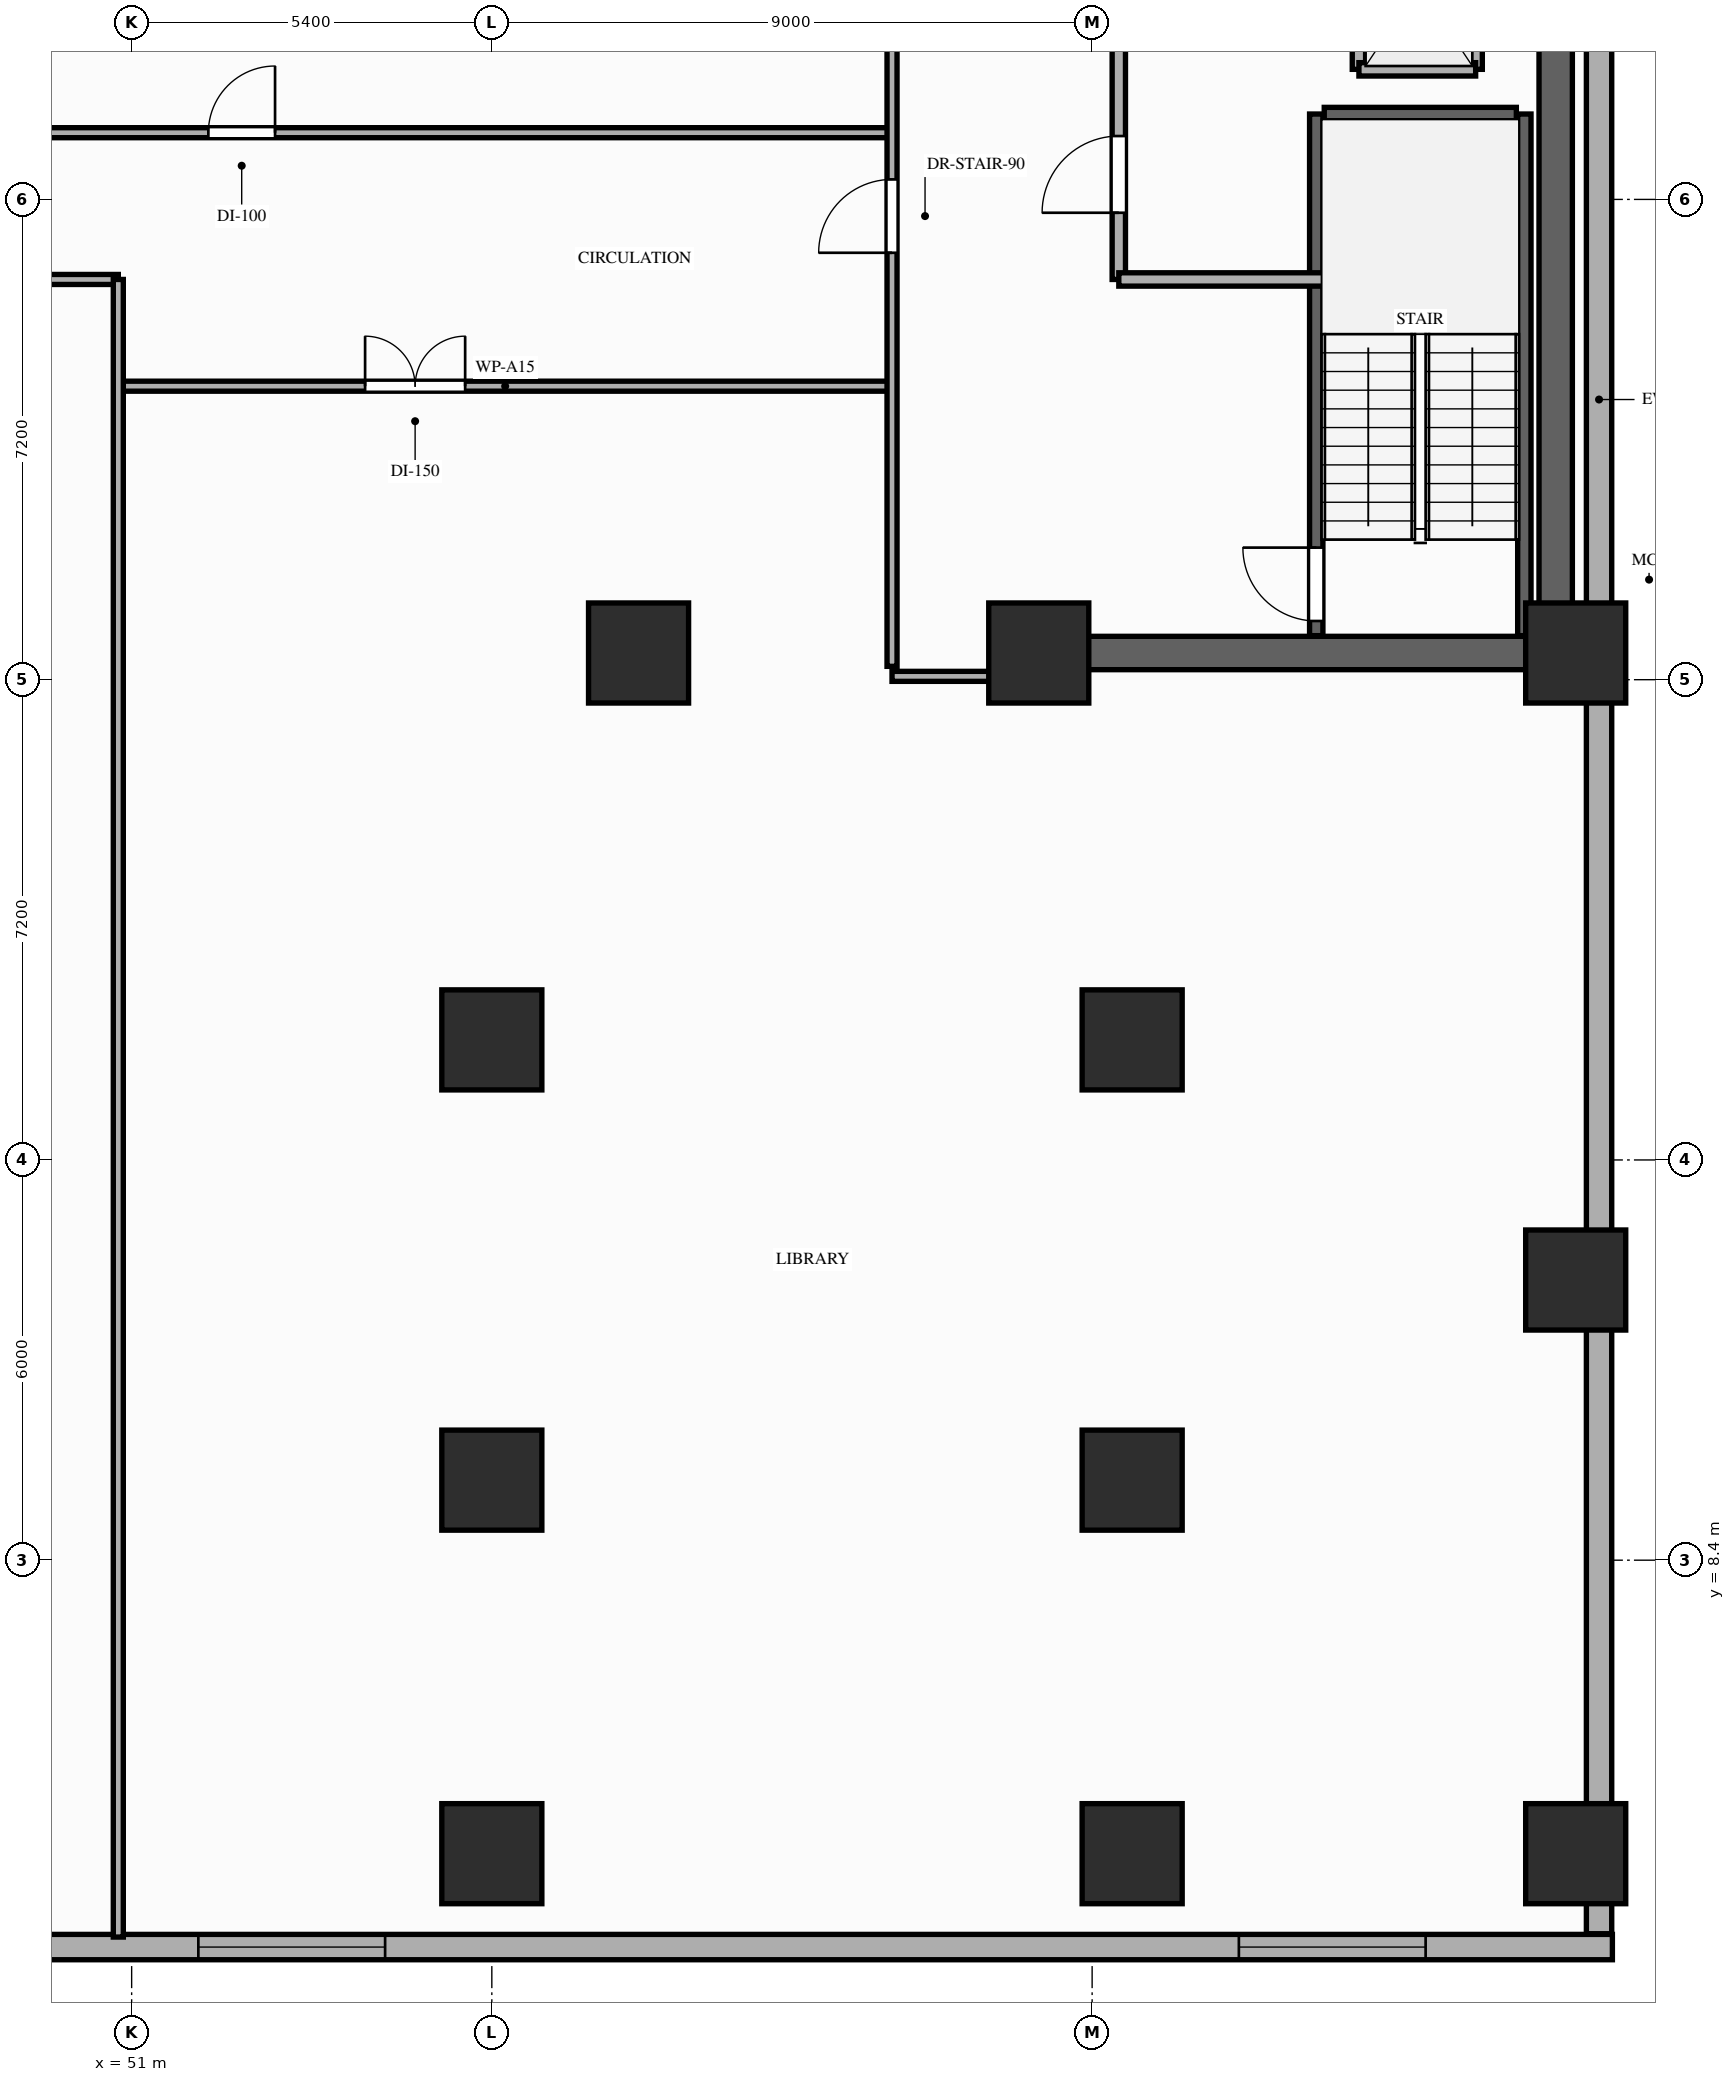
"""IFC4 building model, lengths in metres.
Left out: names, types, materials, properties, quantities, classifications, styles, units other than length and angle.
Written with IfcOpenShell. Run it as: python <this file> out.ifc"""

import sys

from ifc_helpers import new_model, si_unit, direction, frame, frame_2d, origin, origin_2d, place, context, subcontext, project, spatial, rectangle, extrude, element, fill, save


model = new_model("IFC4")
c1 = context("Model", 3, precision=1e-05, world=origin(), true_north=direction((0.0, 1.0)))
c2 = subcontext(c1, "Body", "Model", "MODEL_VIEW")
j1 = project(units=[si_unit("LENGTHUNIT", "METRE"), si_unit("PLANEANGLEUNIT", "RADIAN")], contexts=[c1])
p1 = place(None, origin())
s1 = spatial("IfcSite", under=j1, at=p1, CompositionType="ELEMENT")
p2 = place(p1, origin())
s2 = spatial("IfcBuilding", under=s1, at=p2, CompositionType="ELEMENT")
p3 = place(p2, frame((0.0, 0.0, 8.8)))
s3 = spatial("IfcBuildingStorey", under=s2, at=p3, CompositionType="ELEMENT", Elevation=8.8)
for number, where, z_axis, x_axis in (
    (1, (64.6, 22.0, 0.0), (0.0, 0.0, 1.0), (1.0, 0.0, 0.0)),
    (2, (72.65, 22.0, 0.0), (0.0, 0.0, 1.0), (1.0, 0.0, 0.0)),
    (3, (58.6, 22.0, 0.0), (0.0, 0.0, 1.0), (1.0, 0.0, 0.0)),
    (4, (56.4, 9.6, 0.0), (0.0, 0.0, 1.0), (1.0, 0.0, 0.0)),
    (5, (66.0, 9.6, 0.0), (0.0, 0.0, 1.0), (1.0, 0.0, 0.0)),
    (6, (56.4, 16.2, 0.0), (0.0, 0.0, 1.0), (1.0, 0.0, 0.0)),
    (7, (66.0, 16.2, 0.0), (0.0, 0.0, 1.0), (1.0, 0.0, 0.0)),
    (8, (56.4, 4.0, 0.0), (0.0, 0.0, 1.0), (1.0, 0.0, 0.0)),
    (9, (66.0, 4.0, 0.0), (0.0, 0.0, 1.0), (1.0, 0.0, 0.0)),
    (10, (72.65, 4.0, 0.0), (0.0, 0.0, 1.0), (1.0, 0.0, 0.0)),
    (11, (72.65, 12.6, 0.0), (0.0, 0.0, 1.0), (1.0, 0.0, 0.0)),
):
    element("IfcColumn", number, at=place(p3, frame(where, z_axis=z_axis, x_axis=x_axis)), inside=s3, PredefinedType="COLUMN", context=c2, shape_type="SweptSolid", body=[
        extrude(rectangle(XDim=1.5, YDim=1.5, at=origin_2d()), origin(), (0.0, 0.0, 1.0), 4.2),
    ])
p4 = place(p3, frame((3.6, 2.6, 0.0), z_axis=(0.0, 0.0, 1.0), x_axis=(1.0, 0.0, 0.0)))
e12 = element("IfcWall", 12, at=p4, inside=s3, PredefinedType="STANDARD", context=c2, shape_type="SweptSolid", body=[
    extrude(rectangle(XDim=69.6, YDim=0.38, at=frame_2d((34.8, 0.0))), origin(), (0.0, 0.0, 1.0), 3.95),
])
p5 = place(p4, frame((17.2, 0.0, 0.9)))
e13 = element("IfcOpeningElement", 13, at=p5, cuts=e12, PredefinedType="OPENING", context=c2, shape_type="SweptSolid", body=[
    extrude(rectangle(XDim=2.8, YDim=2.2, at=frame_2d((1.4, 1.1))), frame((0.0, 0.2, 0.0), z_axis=(0.0, -1.0, 0.0), x_axis=(1.0, 0.0, 0.0)), (0.0, 0.0, 1.0), 0.4),
])
p6 = place(p4, frame((24.6, 0.0, 0.9)))
e14 = element("IfcOpeningElement", 14, at=p6, cuts=e12, PredefinedType="OPENING", context=c2, shape_type="SweptSolid", body=[
    extrude(rectangle(XDim=2.8, YDim=2.2, at=frame_2d((1.4, 1.1))), frame((0.0, 0.2, 0.0), z_axis=(0.0, -1.0, 0.0), x_axis=(1.0, 0.0, 0.0)), (0.0, 0.0, 1.0), 0.4),
])
p7 = place(p4, frame((36.2, 0.0, 0.9)))
e15 = element("IfcOpeningElement", 15, at=p7, cuts=e12, PredefinedType="OPENING", context=c2, shape_type="SweptSolid", body=[
    extrude(rectangle(XDim=2.8, YDim=2.2, at=frame_2d((1.4, 1.1))), frame((0.0, 0.2, 0.0), z_axis=(0.0, -1.0, 0.0), x_axis=(1.0, 0.0, 0.0)), (0.0, 0.0, 1.0), 0.4),
])
p8 = place(p4, frame((48.4, 0.0, 0.9)))
e16 = element("IfcOpeningElement", 16, at=p8, cuts=e12, PredefinedType="OPENING", context=c2, shape_type="SweptSolid", body=[
    extrude(rectangle(XDim=2.8, YDim=2.2, at=frame_2d((1.4, 1.1))), frame((0.0, 0.2, 0.0), z_axis=(0.0, -1.0, 0.0), x_axis=(1.0, 0.0, 0.0)), (0.0, 0.0, 1.0), 0.4),
])
p9 = place(p4, frame((64.0, 0.0, 0.9)))
e17 = element("IfcOpeningElement", 17, at=p9, cuts=e12, PredefinedType="OPENING", context=c2, shape_type="SweptSolid", body=[
    extrude(rectangle(XDim=2.8, YDim=2.2, at=frame_2d((1.4, 1.1))), frame((0.0, 0.2, 0.0), z_axis=(0.0, -1.0, 0.0), x_axis=(1.0, 0.0, 0.0)), (0.0, 0.0, 1.0), 0.4),
])
p10 = place(p3, frame((73.0, 2.8, 0.0), z_axis=(0.0, 0.0, 1.0), x_axis=(0.0, 1.0, 0.0)))
e18 = element("IfcWall", 18, at=p10, inside=s3, PredefinedType="STANDARD", context=c2, shape_type="SweptSolid", body=[
    extrude(rectangle(XDim=46.0, YDim=0.38, at=frame_2d((23.0, 0.0))), origin(), (0.0, 0.0, 1.0), 3.13),
])
p11 = place(p3, frame((72.35, 22.0, 0.0), z_axis=(0.0, 0.0, 1.0), x_axis=(0.0, 1.0, 0.0)))
e19 = element("IfcWall", 19, at=p11, inside=s3, PredefinedType="SHEAR", context=c2, shape_type="SweptSolid", body=[
    extrude(rectangle(XDim=20.25, YDim=0.5, at=frame_2d((10.125, 0.0))), origin(), (0.0, 0.0, 1.0), 3.95),
])
p12 = place(p3, frame((64.6, 22.0, 0.0), z_axis=(0.0, 0.0, 1.0), x_axis=(1.0, 0.0, 0.0)))
e20 = element("IfcWall", 20, at=p12, inside=s3, PredefinedType="SHEAR", context=c2, shape_type="SweptSolid", body=[
    extrude(rectangle(XDim=7.5, YDim=0.5, at=frame_2d((3.75, 0.0))), origin(), (0.0, 0.0, 1.0), 3.95),
])
p13 = place(p3, frame((68.76, 22.26, 0.0), z_axis=(0.0, 0.0, 1.0), x_axis=(0.0, 1.0, 0.0)))
e21 = element("IfcWall", 21, at=p13, inside=s3, PredefinedType="SHEAR", context=c2, shape_type="SweptSolid", body=[
    extrude(rectangle(XDim=7.82, YDim=0.2, at=frame_2d((3.91, 0.0))), origin(), (0.0, 0.0, 1.0), 3.95),
])
p14 = place(p13, frame((0.22, 0.0, 0.0)))
e22 = element("IfcOpeningElement", 22, at=p14, cuts=e21, PredefinedType="OPENING", context=c2, shape_type="SweptSolid", body=[
    extrude(rectangle(XDim=1.1, YDim=2.15, at=frame_2d((0.55, 1.075))), frame((0.0, 0.11, 0.0), z_axis=(0.0, -1.0, 0.0), x_axis=(1.0, 0.0, 0.0)), (0.0, 0.0, 1.0), 0.22),
])
p15 = place(p3, frame((71.88, 22.26, 0.0), z_axis=(0.0, 0.0, 1.0), x_axis=(0.0, 1.0, 0.0)))
e23 = element("IfcWall", 23, at=p15, inside=s3, PredefinedType="SHEAR", context=c2, shape_type="SweptSolid", body=[
    extrude(rectangle(XDim=7.82, YDim=0.2, at=frame_2d((3.91, 0.0))), origin(), (0.0, 0.0, 1.0), 3.95),
])
p16 = place(p3, frame((68.88, 30.08, 0.0), z_axis=(0.0, 0.0, 1.0), x_axis=(1.0, 0.0, 0.0)))
e24 = element("IfcWall", 24, at=p16, inside=s3, PredefinedType="SHEAR", context=c2, shape_type="SweptSolid", body=[
    extrude(rectangle(XDim=2.88, YDim=0.2, at=frame_2d((1.44, 0.0))), origin(), (0.0, 0.0, 1.0), 3.95),
])
p17 = place(p3, frame((69.4, 30.75, 0.0), z_axis=(0.0, 0.0, 1.0), x_axis=(0.0, 1.0, 0.0)))
e25 = element("IfcWall", 25, at=p17, inside=s3, PredefinedType="MOVABLE", context=c2, shape_type="SweptSolid", body=[
    extrude(rectangle(XDim=2.45, YDim=0.2, at=frame_2d((1.225, 0.0))), origin(), (0.0, 0.0, 1.0), 3.95),
])
p18 = place(p17, frame((0.65, 0.0, 0.0)))
e26 = element("IfcOpeningElement", 26, at=p18, cuts=e25, PredefinedType="OPENING", context=c2, shape_type="SweptSolid", body=[
    extrude(rectangle(XDim=1.05, YDim=2.15, at=frame_2d((0.525, 1.075))), frame((0.0, 0.11, 0.0), z_axis=(0.0, -1.0, 0.0), x_axis=(1.0, 0.0, 0.0)), (0.0, 0.0, 1.0), 0.22),
])
p19 = place(p3, frame((71.15, 30.75, 0.0), z_axis=(0.0, 0.0, 1.0), x_axis=(0.0, 1.0, 0.0)))
e27 = element("IfcWall", 27, at=p19, inside=s3, PredefinedType="MOVABLE", context=c2, shape_type="SweptSolid", body=[
    extrude(rectangle(XDim=2.45, YDim=0.2, at=frame_2d((1.225, 0.0))), origin(), (0.0, 0.0, 1.0), 3.95),
])
p20 = place(p3, frame((69.4, 30.75, 0.0), z_axis=(0.0, 0.0, 1.0), x_axis=(1.0, 0.0, 0.0)))
e28 = element("IfcWall", 28, at=p20, inside=s3, PredefinedType="MOVABLE", context=c2, shape_type="SweptSolid", body=[
    extrude(rectangle(XDim=1.75, YDim=0.2, at=frame_2d((0.875, 0.0))), origin(), (0.0, 0.0, 1.0), 3.95),
])
p21 = place(p3, frame((65.8, 27.6, 0.0), z_axis=(0.0, 0.0, 1.0), x_axis=(0.0, 1.0, 0.0)))
e29 = element("IfcWall", 29, at=p21, inside=s3, PredefinedType="PARTITIONING", context=c2, shape_type="SweptSolid", body=[
    extrude(rectangle(XDim=5.5, YDim=0.2, at=frame_2d((2.75, 0.0))), origin(), (0.0, 0.0, 1.0), 3.95),
])
p22 = place(p21, frame((1.0, 0.0, 0.0)))
e30 = element("IfcOpeningElement", 30, at=p22, cuts=e29, PredefinedType="OPENING", context=c2, shape_type="SweptSolid", body=[
    extrude(rectangle(XDim=1.15, YDim=2.15, at=frame_2d((0.575, 1.075))), frame((0.0, 0.11, 0.0), z_axis=(0.0, -1.0, 0.0), x_axis=(1.0, 0.0, 0.0)), (0.0, 0.0, 1.0), 0.22),
])
p23 = place(p3, frame((65.8, 27.6, 0.0), z_axis=(0.0, 0.0, 1.0), x_axis=(1.0, 0.0, 0.0)))
e31 = element("IfcWall", 31, at=p23, inside=s3, PredefinedType="PARTITIONING", context=c2, shape_type="SweptSolid", body=[
    extrude(rectangle(XDim=3.4, YDim=0.2, at=frame_2d((1.7, 0.0))), origin(), (0.0, 0.0, 1.0), 3.95),
])
p24 = place(p3, frame((24.4, 27.6, 0.0), z_axis=(0.0, 0.0, 1.0), x_axis=(1.0, 0.0, 0.0)))
e32 = element("IfcWall", 32, at=p24, inside=s3, PredefinedType="PARTITIONING", context=c2, shape_type="SweptSolid", body=[
    extrude(rectangle(XDim=26.4, YDim=0.15, at=frame_2d((13.2, 0.0))), origin(), (0.0, 0.0, 1.0), 3.13),
])
p25 = place(p24, frame((7.6, 0.0, 0.0)))
e33 = element("IfcOpeningElement", 33, at=p25, cuts=e32, PredefinedType="OPENING", context=c2, shape_type="SweptSolid", body=[
    extrude(rectangle(XDim=1.5, YDim=2.18, at=frame_2d((0.75, 1.09))), frame((0.0, 0.085, 0.0), z_axis=(0.0, -1.0, 0.0), x_axis=(1.0, 0.0, 0.0)), (0.0, 0.0, 1.0), 0.17),
])
p26 = place(p3, frame((50.8, 26.0, 0.0), z_axis=(0.0, 0.0, 1.0), x_axis=(1.0, 0.0, 0.0)))
e34 = element("IfcWall", 34, at=p26, inside=s3, PredefinedType="PARTITIONING", context=c2, shape_type="SweptSolid", body=[
    extrude(rectangle(XDim=11.6, YDim=0.15, at=frame_2d((5.8, 0.0))), origin(), (0.0, 0.0, 1.0), 3.13),
])
p27 = place(p26, frame((3.7, 0.0, 0.0)))
e35 = element("IfcOpeningElement", 35, at=p27, cuts=e34, PredefinedType="OPENING", context=c2, shape_type="SweptSolid", body=[
    extrude(rectangle(XDim=1.5, YDim=2.18, at=frame_2d((0.75, 1.09))), frame((0.0, 0.085, 0.0), z_axis=(0.0, -1.0, 0.0), x_axis=(1.0, 0.0, 0.0)), (0.0, 0.0, 1.0), 0.17),
])
p28 = place(p3, frame((27.15, 29.8, 0.0), z_axis=(0.0, 0.0, 1.0), x_axis=(1.0, 0.0, 0.0)))
e36 = element("IfcWall", 36, at=p28, inside=s3, PredefinedType="PARTITIONING", context=c2, shape_type="SweptSolid", body=[
    extrude(rectangle(XDim=35.25, YDim=0.15, at=frame_2d((17.625, 0.0))), origin(), (0.0, 0.0, 1.0), 3.13),
])
p29 = place(p28, frame((25.0, 0.0, 0.0)))
e37 = element("IfcOpeningElement", 37, at=p29, cuts=e36, PredefinedType="OPENING", context=c2, shape_type="SweptSolid", body=[
    extrude(rectangle(XDim=1.0, YDim=2.15, at=frame_2d((0.5, 1.075))), frame((0.0, 0.085, 0.0), z_axis=(0.0, -1.0, 0.0), x_axis=(1.0, 0.0, 0.0)), (0.0, 0.0, 1.0), 0.17),
])
p30 = place(p28, frame((1.4, 0.0, 0.0)))
e38 = element("IfcOpeningElement", 38, at=p30, cuts=e36, PredefinedType="OPENING", context=c2, shape_type="SweptSolid", body=[
    extrude(rectangle(XDim=0.85, YDim=2.1, at=frame_2d((0.425, 1.05))), frame((0.0, 0.085, 0.0), z_axis=(0.0, -1.0, 0.0), x_axis=(1.0, 0.0, 0.0)), (0.0, 0.0, 1.0), 0.17),
])
p31 = place(p28, frame((5.4, 0.0, 0.0)))
e39 = element("IfcOpeningElement", 39, at=p31, cuts=e36, PredefinedType="OPENING", context=c2, shape_type="SweptSolid", body=[
    extrude(rectangle(XDim=0.95, YDim=2.1, at=frame_2d((0.475, 1.05))), frame((0.0, 0.085, 0.0), z_axis=(0.0, -1.0, 0.0), x_axis=(1.0, 0.0, 0.0)), (0.0, 0.0, 1.0), 0.17),
])
p32 = place(p28, frame((12.6, 0.0, 0.0)))
e40 = element("IfcOpeningElement", 40, at=p32, cuts=e36, PredefinedType="OPENING", context=c2, shape_type="SweptSolid", body=[
    extrude(rectangle(XDim=1.0, YDim=2.15, at=frame_2d((0.5, 1.075))), frame((0.0, 0.085, 0.0), z_axis=(0.0, -1.0, 0.0), x_axis=(1.0, 0.0, 0.0)), (0.0, 0.0, 1.0), 0.17),
])
p33 = place(p3, frame((50.8, 2.75, 0.0), z_axis=(0.0, 0.0, 1.0), x_axis=(0.0, 1.0, 0.0)))
e41 = element("IfcWall", 41, at=p33, inside=s3, PredefinedType="PARTITIONING", context=c2, shape_type="SweptSolid", body=[
    extrude(rectangle(XDim=24.85, YDim=0.15, at=frame_2d((12.425, 0.0))), origin(), (0.0, 0.0, 1.0), 3.13),
])
p34 = place(p3, frame((62.4, 21.8, 0.0), z_axis=(0.0, 0.0, 1.0), x_axis=(0.0, 1.0, 0.0)))
e42 = element("IfcWall", 42, at=p34, inside=s3, PredefinedType="PARTITIONING", context=c2, shape_type="SweptSolid", body=[
    extrude(rectangle(XDim=27.05, YDim=0.15, at=frame_2d((13.525, 0.0))), origin(), (0.0, 0.0, 1.0), 3.13),
])
p35 = place(p34, frame((6.2, 0.0, 0.0)))
e43 = element("IfcOpeningElement", 43, at=p35, cuts=e42, PredefinedType="OPENING", context=c2, shape_type="SweptSolid", body=[
    extrude(rectangle(XDim=1.1, YDim=2.15, at=frame_2d((0.55, 1.075))), frame((0.0, 0.085, 0.0), z_axis=(0.0, -1.0, 0.0), x_axis=(1.0, 0.0, 0.0)), (0.0, 0.0, 1.0), 0.17),
])
p36 = place(p3, frame((62.4, 21.65, 0.0), z_axis=(0.0, 0.0, 1.0), x_axis=(1.0, 0.0, 0.0)))
e44 = element("IfcWall", 44, at=p36, inside=s3, PredefinedType="PARTITIONING", context=c2, shape_type="SweptSolid", body=[
    extrude(rectangle(XDim=2.05, YDim=0.15, at=frame_2d((1.025, 0.0))), origin(), (0.0, 0.0, 1.0), 3.13),
])
p37 = place(p8, origin())
e45 = element("IfcWindow", 45, at=p37, inside=s3, PartitioningType="SINGLE_PANEL", PredefinedType="WINDOW", context=c2, shape_type="SweptSolid", body=[
    extrude(rectangle(XDim=2.8, YDim=2.2, at=frame_2d((1.4, 1.1))), frame((0.0, 0.03, 0.0), z_axis=(0.0, -1.0, 0.0), x_axis=(1.0, 0.0, 0.0)), (0.0, 0.0, 1.0), 0.06),
])
fill(e16, e45)
p38 = place(p9, origin())
e46 = element("IfcWindow", 46, at=p38, inside=s3, PartitioningType="SINGLE_PANEL", PredefinedType="WINDOW", context=c2, shape_type="SweptSolid", body=[
    extrude(rectangle(XDim=2.8, YDim=2.2, at=frame_2d((1.4, 1.1))), frame((0.0, 0.03, 0.0), z_axis=(0.0, -1.0, 0.0), x_axis=(1.0, 0.0, 0.0)), (0.0, 0.0, 1.0), 0.06),
])
fill(e17, e46)
p39 = place(p14, origin())
e47 = element("IfcDoor", 47, at=p39, inside=s3, OperationType="SINGLE_SWING_RIGHT", PredefinedType="DOOR", context=c2, shape_type="SweptSolid", body=[
    extrude(rectangle(XDim=1.1, YDim=2.15, at=frame_2d((0.55, 1.075))), frame((0.0, 0.025, 0.0), z_axis=(0.0, -1.0, 0.0), x_axis=(1.0, 0.0, 0.0)), (0.0, 0.0, 1.0), 0.05),
])
fill(e22, e47)
p40 = place(p22, origin())
e48 = element("IfcDoor", 48, at=p40, inside=s3, OperationType="SINGLE_SWING_LEFT", PredefinedType="DOOR", context=c2, shape_type="SweptSolid", body=[
    extrude(rectangle(XDim=1.15, YDim=2.15, at=frame_2d((0.575, 1.075))), frame((0.0, 0.025, 0.0), z_axis=(0.0, -1.0, 0.0), x_axis=(1.0, 0.0, 0.0)), (0.0, 0.0, 1.0), 0.05),
])
fill(e30, e48)
p41 = place(p29, origin())
e49 = element("IfcDoor", 49, at=p41, inside=s3, OperationType="SINGLE_SWING_RIGHT", PredefinedType="DOOR", context=c2, shape_type="SweptSolid", body=[
    extrude(rectangle(XDim=1.0, YDim=2.15, at=frame_2d((0.5, 1.075))), frame((0.0, 0.025, 0.0), z_axis=(0.0, -1.0, 0.0), x_axis=(1.0, 0.0, 0.0)), (0.0, 0.0, 1.0), 0.05),
])
fill(e37, e49)
p42 = place(p27, origin())
e50 = element("IfcDoor", 50, at=p42, inside=s3, OperationType="DOUBLE_DOOR_SINGLE_SWING", PredefinedType="DOOR", context=c2, shape_type="SweptSolid", body=[
    extrude(rectangle(XDim=1.5, YDim=2.18, at=frame_2d((0.75, 1.09))), frame((0.0, 0.025, 0.0), z_axis=(0.0, -1.0, 0.0), x_axis=(1.0, 0.0, 0.0)), (0.0, 0.0, 1.0), 0.05),
])
fill(e35, e50)
p43 = place(p35, origin())
e51 = element("IfcDoor", 51, at=p43, inside=s3, OperationType="SINGLE_SWING_LEFT", PredefinedType="DOOR", context=c2, shape_type="SweptSolid", body=[
    extrude(rectangle(XDim=1.1, YDim=2.15, at=frame_2d((0.55, 1.075))), frame((0.0, 0.025, 0.0), z_axis=(0.0, -1.0, 0.0), x_axis=(1.0, 0.0, 0.0)), (0.0, 0.0, 1.0), 0.05),
])
fill(e43, e51)
save(model, sys.argv[1])
